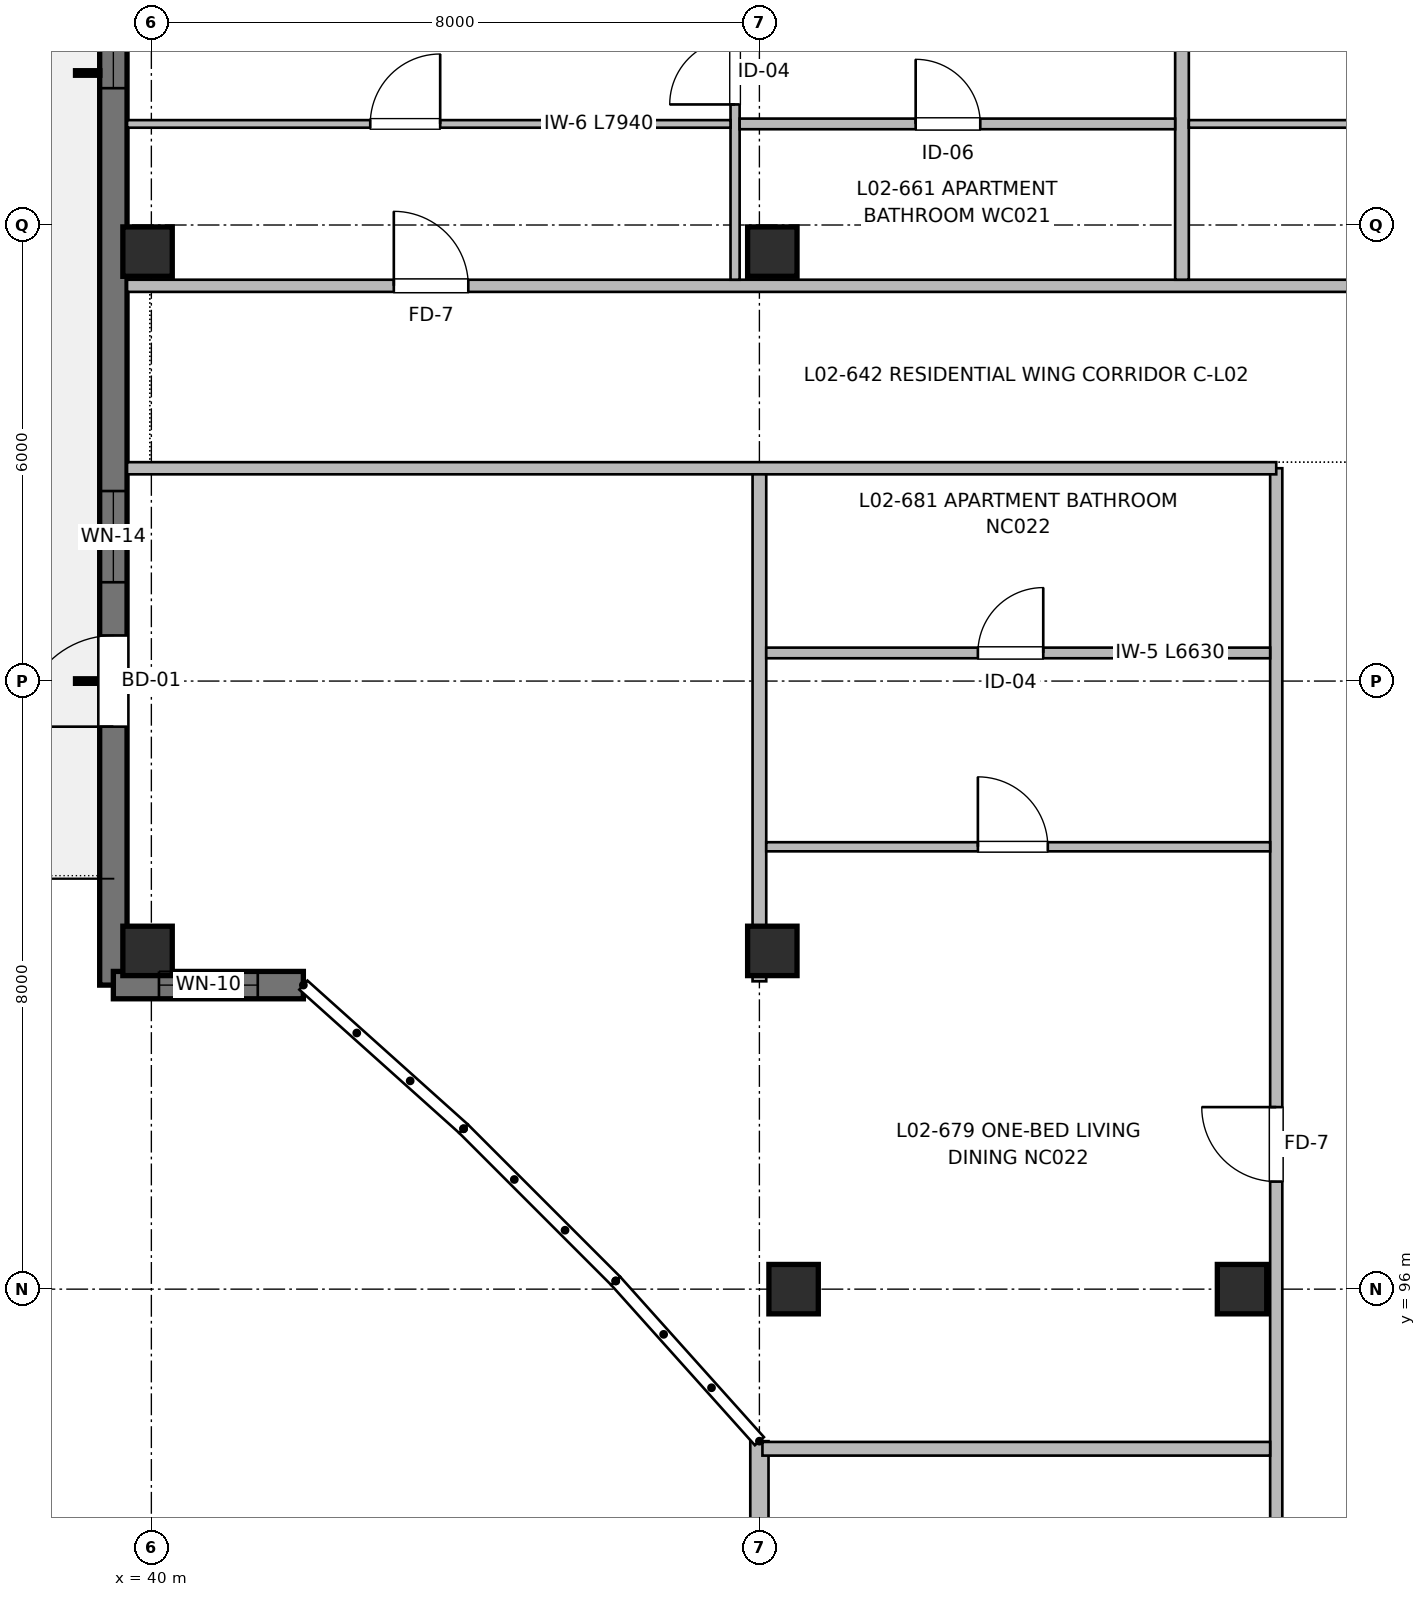
"""IFC4 building model, lengths in metres.
Left out: names, types, materials, properties, quantities, classifications, styles, units other than length and angle.
Written with IfcOpenShell. Run it as: python <this file> out.ifc"""

import sys

from ifc_helpers import new_model, si_unit, direction, frame, frame_2d, origin, origin_2d, place, context, subcontext, project, spatial, rectangle, extrude, element, fill, save


model = new_model("IFC4")
c1 = context("Model", 3, precision=1e-05, world=origin(), true_north=direction((0.0, 1.0)))
c2 = subcontext(c1, "Body", "Model", "MODEL_VIEW")
j1 = project(units=[si_unit("LENGTHUNIT", "METRE"), si_unit("PLANEANGLEUNIT", "RADIAN")], contexts=[c1])
p1 = place(None, origin())
s1 = spatial("IfcSite", under=j1, at=p1, CompositionType="ELEMENT")
p2 = place(p1, origin())
s2 = spatial("IfcBuilding", under=s1, at=p2, CompositionType="ELEMENT")
p3 = place(p2, frame((0.0, 0.0, 7.36)))
s3 = spatial("IfcBuildingStorey", under=s2, at=p3, CompositionType="ELEMENT", Elevation=7.36)
for number, where, z_axis, x_axis in (
    (1, (39.95, 100.45, 0.0), (0.0, 0.0, 1.0), (1.0, 0.0, 0.0)),
    (2, (39.95, 109.65, 0.0), (0.0, 0.0, 1.0), (1.0, 0.0, 0.0)),
    (3, (48.17, 100.45, 0.0), (0.0, 0.0, 1.0), (1.0, 0.0, 0.0)),
    (4, (48.17, 109.65, 0.0), (0.0, 0.0, 1.0), (1.0, 0.0, 0.0)),
    (5, (48.45, 96.0, 0.0), (0.0, 0.0, 1.0), (1.0, 0.0, 0.0)),
    (6, (54.35, 96.0, 0.0), (0.0, 0.0, 1.0), (1.0, 0.0, 0.0)),
):
    element("IfcColumn", number, at=place(p3, frame(where, z_axis=z_axis, x_axis=x_axis)), inside=s3, PredefinedType="COLUMN", context=c2, shape_type="SweptSolid", body=[
        extrude(rectangle(XDim=0.65, YDim=0.65, at=origin_2d()), origin(), (0.0, 0.0, 1.0), 3.2),
    ])
p4 = place(p3, frame((39.5, 100.0, 0.0), z_axis=(0.0, 0.0, 1.0), x_axis=(0.0, 1.0, 0.0)))
e7 = element("IfcWall", 7, at=p4, inside=s3, PredefinedType="SHEAR", context=c2, shape_type="SweptSolid", body=[
    extrude(rectangle(XDim=16.0, YDim=0.36, at=frame_2d((8.0, 0.0))), origin(), (0.0, 0.0, 1.0), 2.98),
])
p5 = place(p4, frame((3.4, 0.0, 0.0)))
e8 = element("IfcOpeningElement", 8, at=p5, cuts=e7, PredefinedType="OPENING", context=c2, shape_type="SweptSolid", body=[
    extrude(rectangle(XDim=1.2, YDim=2.2, at=frame_2d((0.6, 1.1))), frame((0.0, 0.19, 0.0), z_axis=(0.0, -1.0, 0.0), x_axis=(1.0, 0.0, 0.0)), (0.0, 0.0, 1.0), 0.38),
])
p6 = place(p4, frame((5.3, 0.0, 0.9)))
e9 = element("IfcOpeningElement", 9, at=p6, cuts=e7, PredefinedType="OPENING", context=c2, shape_type="SweptSolid", body=[
    extrude(rectangle(XDim=1.2, YDim=1.05, at=frame_2d((0.6, 0.525))), frame((0.0, 0.19, 0.0), z_axis=(0.0, -1.0, 0.0), x_axis=(1.0, 0.0, 0.0)), (0.0, 0.0, 1.0), 0.38),
])
p7 = place(p4, frame((11.8, 0.0, 0.67)))
e10 = element("IfcOpeningElement", 10, at=p7, cuts=e7, PredefinedType="OPENING", context=c2, shape_type="SweptSolid", body=[
    extrude(rectangle(XDim=2.1, YDim=1.55, at=frame_2d((1.05, 0.775))), frame((0.0, 0.19, 0.0), z_axis=(0.0, -1.0, 0.0), x_axis=(1.0, 0.0, 0.0)), (0.0, 0.0, 1.0), 0.38),
])
p8 = place(p3, frame((42.0, 100.0, 0.0), z_axis=(0.0, 0.0, 1.0), x_axis=(-1.0, 0.0, 0.0)))
e11 = element("IfcWall", 11, at=p8, inside=s3, PredefinedType="SHEAR", context=c2, shape_type="SweptSolid", body=[
    extrude(rectangle(XDim=2.5, YDim=0.36, at=frame_2d((1.25, 0.0))), origin(), (0.0, 0.0, 1.0), 2.98),
])
p9 = place(p8, frame((0.6, 0.0, 0.82)))
e12 = element("IfcOpeningElement", 12, at=p9, cuts=e11, PredefinedType="OPENING", context=c2, shape_type="SweptSolid", body=[
    extrude(rectangle(XDim=1.3, YDim=1.4, at=frame_2d((0.65, 0.7))), frame((0.0, 0.19, 0.0), z_axis=(0.0, -1.0, 0.0), x_axis=(1.0, 0.0, 0.0)), (0.0, 0.0, 1.0), 0.38),
])
p10 = place(p3, frame((48.0, 56.0, 0.0), z_axis=(0.0, 0.0, 1.0), x_axis=(0.0, 1.0, 0.0)))
e13 = element("IfcWall", 13, at=p10, inside=s3, PredefinedType="SOLIDWALL", context=c2, shape_type="SweptSolid", body=[
    extrude(rectangle(XDim=38.0, YDim=0.24, at=frame_2d((19.0, 0.0))), origin(), (0.0, 0.0, 1.0), 2.98),
])
p11 = place(p10, frame((4.95, 0.0, 0.0)))
e14 = element("IfcOpeningElement", 14, at=p11, cuts=e13, PredefinedType="OPENING", context=c2, shape_type="SweptSolid", body=[
    extrude(rectangle(XDim=1.2, YDim=2.2, at=frame_2d((0.6, 1.1))), frame((0.0, 0.13, 0.0), z_axis=(0.0, -1.0, 0.0), x_axis=(1.0, 0.0, 0.0)), (0.0, 0.0, 1.0), 0.26),
])
p12 = place(p10, frame((13.2, 0.0, 0.67)))
e15 = element("IfcOpeningElement", 15, at=p12, cuts=e13, PredefinedType="OPENING", context=c2, shape_type="SweptSolid", body=[
    extrude(rectangle(XDim=2.1, YDim=1.55, at=frame_2d((1.05, 0.775))), frame((0.0, 0.13, 0.0), z_axis=(0.0, -1.0, 0.0), x_axis=(1.0, 0.0, 0.0)), (0.0, 0.0, 1.0), 0.26),
])
p13 = place(p10, frame((18.825, 0.0, 0.72)))
e16 = element("IfcOpeningElement", 16, at=p13, cuts=e13, PredefinedType="OPENING", context=c2, shape_type="SweptSolid", body=[
    extrude(rectangle(XDim=2.25, YDim=1.5, at=frame_2d((1.125, 0.75))), frame((0.0, 0.13, 0.0), z_axis=(0.0, -1.0, 0.0), x_axis=(1.0, 0.0, 0.0)), (0.0, 0.0, 1.0), 0.26),
])
p14 = place(p10, frame((32.725, 0.0, 0.9)))
e17 = element("IfcOpeningElement", 17, at=p14, cuts=e13, PredefinedType="OPENING", context=c2, shape_type="SweptSolid", body=[
    extrude(rectangle(XDim=1.05, YDim=1.15, at=frame_2d((0.525, 0.575))), frame((0.0, 0.13, 0.0), z_axis=(0.0, -1.0, 0.0), x_axis=(1.0, 0.0, 0.0)), (0.0, 0.0, 1.0), 0.26),
])
p15 = place(p3, frame((54.8, 56.18, 0.0), z_axis=(0.0, 0.0, 1.0), x_axis=(0.0, 1.0, 0.0)))
e18 = element("IfcWall", 18, at=p15, inside=s3, PredefinedType="PARTITIONING", context=c2, shape_type="SweptSolid", body=[
    extrude(rectangle(XDim=50.62, YDim=0.16, at=frame_2d((25.31, 0.0))), origin(), (0.0, 0.0, 1.0), 2.935),
])
p16 = place(p15, frame((12.82, 0.0, 0.0)))
e19 = element("IfcOpeningElement", 19, at=p16, cuts=e18, PredefinedType="OPENING", context=c2, shape_type="SweptSolid", body=[
    extrude(rectangle(XDim=1.1, YDim=2.15, at=frame_2d((0.55, 1.075))), frame((0.0, 0.09, 0.0), z_axis=(0.0, -1.0, 0.0), x_axis=(1.0, 0.0, 0.0)), (0.0, 0.0, 1.0), 0.18),
])
p17 = place(p15, frame((19.22, 0.0, 0.0)))
e20 = element("IfcOpeningElement", 20, at=p17, cuts=e18, PredefinedType="OPENING", context=c2, shape_type="SweptSolid", body=[
    extrude(rectangle(XDim=1.6, YDim=2.15, at=frame_2d((0.8, 1.075))), frame((0.0, 0.09, 0.0), z_axis=(0.0, -1.0, 0.0), x_axis=(1.0, 0.0, 0.0)), (0.0, 0.0, 1.0), 0.18),
])
p18 = place(p15, frame((1.8, 0.0, 0.0)))
e21 = element("IfcOpeningElement", 21, at=p18, cuts=e18, PredefinedType="OPENING", context=c2, shape_type="SweptSolid", body=[
    extrude(rectangle(XDim=0.96, YDim=2.15, at=frame_2d((0.48, 1.075))), frame((0.0, 0.09, 0.0), z_axis=(0.0, -1.0, 0.0), x_axis=(1.0, 0.0, 0.0)), (0.0, 0.0, 1.0), 0.18),
])
p19 = place(p15, frame((32.625, 0.0, 0.0)))
e22 = element("IfcOpeningElement", 22, at=p19, cuts=e18, PredefinedType="OPENING", context=c2, shape_type="SweptSolid", body=[
    extrude(rectangle(XDim=0.98, YDim=2.15, at=frame_2d((0.49, 1.075))), frame((0.0, 0.09, 0.0), z_axis=(0.0, -1.0, 0.0), x_axis=(1.0, 0.0, 0.0)), (0.0, 0.0, 1.0), 0.18),
])
p20 = place(p15, frame((41.235, 0.0, 0.0)))
e23 = element("IfcOpeningElement", 23, at=p20, cuts=e18, PredefinedType="OPENING", context=c2, shape_type="SweptSolid", body=[
    extrude(rectangle(XDim=0.98, YDim=2.15, at=frame_2d((0.49, 1.075))), frame((0.0, 0.09, 0.0), z_axis=(0.0, -1.0, 0.0), x_axis=(1.0, 0.0, 0.0)), (0.0, 0.0, 1.0), 0.18),
])
p21 = place(p3, frame((39.68, 106.8, 0.0), z_axis=(0.0, 0.0, 1.0), x_axis=(1.0, 0.0, 0.0)))
e24 = element("IfcWall", 24, at=p21, inside=s3, PredefinedType="PARTITIONING", context=c2, shape_type="SweptSolid", body=[
    extrude(rectangle(XDim=15.12, YDim=0.16, at=frame_2d((7.56, 0.0))), origin(), (0.0, 0.0, 1.0), 2.935),
])
p22 = place(p3, frame((39.68, 109.2, 0.0), z_axis=(0.0, 0.0, 1.0), x_axis=(1.0, 0.0, 0.0)))
e25 = element("IfcWall", 25, at=p22, inside=s3, PredefinedType="PARTITIONING", context=c2, shape_type="SweptSolid", body=[
    extrude(rectangle(XDim=41.64, YDim=0.16, at=frame_2d((20.82, 0.0))), origin(), (0.0, 0.0, 1.0), 2.935),
])
p23 = place(p22, frame((3.51, 0.0, 0.0)))
e26 = element("IfcOpeningElement", 26, at=p23, cuts=e25, PredefinedType="OPENING", context=c2, shape_type="SweptSolid", body=[
    extrude(rectangle(XDim=0.98, YDim=2.15, at=frame_2d((0.49, 1.075))), frame((0.0, 0.09, 0.0), z_axis=(0.0, -1.0, 0.0), x_axis=(1.0, 0.0, 0.0)), (0.0, 0.0, 1.0), 0.18),
])
p24 = place(p22, frame((17.455, 0.0, 0.0)))
e27 = element("IfcOpeningElement", 27, at=p24, cuts=e25, PredefinedType="OPENING", context=c2, shape_type="SweptSolid", body=[
    extrude(rectangle(XDim=0.98, YDim=2.15, at=frame_2d((0.49, 1.075))), frame((0.0, 0.09, 0.0), z_axis=(0.0, -1.0, 0.0), x_axis=(1.0, 0.0, 0.0)), (0.0, 0.0, 1.0), 0.18),
])
p25 = place(p22, frame((31.36, 0.0, 0.0)))
e28 = element("IfcOpeningElement", 28, at=p25, cuts=e25, PredefinedType="OPENING", context=c2, shape_type="SweptSolid", body=[
    extrude(rectangle(XDim=0.98, YDim=2.15, at=frame_2d((0.49, 1.075))), frame((0.0, 0.09, 0.0), z_axis=(0.0, -1.0, 0.0), x_axis=(1.0, 0.0, 0.0)), (0.0, 0.0, 1.0), 0.18),
])
p26 = place(p3, frame((48.0, 100.05, 0.0), z_axis=(0.0, 0.0, 1.0), x_axis=(0.0, 1.0, 0.0)))
e29 = element("IfcWall", 29, at=p26, inside=s3, PredefinedType="PARTITIONING", context=c2, shape_type="SweptSolid", body=[
    extrude(rectangle(XDim=6.67, YDim=0.18, at=frame_2d((3.335, 0.0))), origin(), (0.0, 0.0, 1.0), 2.68),
])
p27 = place(p3, frame((53.56, 109.28, 0.0), z_axis=(0.0, 0.0, 1.0), x_axis=(0.0, 1.0, 0.0)))
e30 = element("IfcWall", 30, at=p27, inside=s3, PredefinedType="PARTITIONING", context=c2, shape_type="SweptSolid", body=[
    extrude(rectangle(XDim=6.6, YDim=0.18, at=frame_2d((3.3, 0.0))), origin(), (0.0, 0.0, 1.0), 2.935),
])
p28 = place(p3, frame((47.68, 109.28, 0.0), z_axis=(0.0, 0.0, 1.0), x_axis=(0.0, 1.0, 0.0)))
e31 = element("IfcWall", 31, at=p28, inside=s3, PredefinedType="PARTITIONING", context=c2, shape_type="SweptSolid", body=[
    extrude(rectangle(XDim=6.6, YDim=0.12, at=frame_2d((3.3, 0.0))), origin(), (0.0, 0.0, 1.0), 2.935),
])
p29 = place(p28, frame((2.306, 0.0, 0.0)))
e32 = element("IfcOpeningElement", 32, at=p29, cuts=e31, PredefinedType="OPENING", context=c2, shape_type="SweptSolid", body=[
    extrude(rectangle(XDim=0.86, YDim=2.1, at=frame_2d((0.43, 1.05))), frame((0.0, 0.07, 0.0), z_axis=(0.0, -1.0, 0.0), x_axis=(1.0, 0.0, 0.0)), (0.0, 0.0, 1.0), 0.14),
])
p30 = place(p28, frame((4.097, 0.0, 0.0)))
e33 = element("IfcOpeningElement", 33, at=p30, cuts=e31, PredefinedType="OPENING", context=c2, shape_type="SweptSolid", body=[
    extrude(rectangle(XDim=0.9, YDim=2.1, at=frame_2d((0.45, 1.05))), frame((0.0, 0.07, 0.0), z_axis=(0.0, -1.0, 0.0), x_axis=(1.0, 0.0, 0.0)), (0.0, 0.0, 1.0), 0.14),
])
p31 = place(p3, frame((47.74, 111.33, 0.0), z_axis=(0.0, 0.0, 1.0), x_axis=(1.0, 0.0, 0.0)))
e34 = element("IfcWall", 34, at=p31, inside=s3, PredefinedType="PARTITIONING", context=c2, shape_type="SweptSolid", body=[
    extrude(rectangle(XDim=5.73, YDim=0.14, at=frame_2d((2.865, 0.0))), origin(), (0.0, 0.0, 1.0), 2.935),
])
p32 = place(p31, frame((2.316, 0.0, 0.0)))
e35 = element("IfcOpeningElement", 35, at=p32, cuts=e34, PredefinedType="OPENING", context=c2, shape_type="SweptSolid", body=[
    extrude(rectangle(XDim=0.85, YDim=2.05, at=frame_2d((0.425, 1.025))), frame((0.0, 0.08, 0.0), z_axis=(0.0, -1.0, 0.0), x_axis=(1.0, 0.0, 0.0)), (0.0, 0.0, 1.0), 0.16),
])
p33 = place(p3, frame((39.68, 111.33, 0.0), z_axis=(0.0, 0.0, 1.0), x_axis=(1.0, 0.0, 0.0)))
e36 = element("IfcWall", 36, at=p33, inside=s3, PredefinedType="PARTITIONING", context=c2, shape_type="SweptSolid", body=[
    extrude(rectangle(XDim=7.94, YDim=0.1, at=frame_2d((3.97, 0.0))), origin(), (0.0, 0.0, 1.0), 2.935),
])
p34 = place(p33, frame((3.2, 0.0, 0.0)))
e37 = element("IfcOpeningElement", 37, at=p34, cuts=e36, PredefinedType="OPENING", context=c2, shape_type="SweptSolid", body=[
    extrude(rectangle(XDim=0.92, YDim=2.1, at=frame_2d((0.46, 1.05))), frame((0.0, 0.06, 0.0), z_axis=(0.0, -1.0, 0.0), x_axis=(1.0, 0.0, 0.0)), (0.0, 0.0, 1.0), 0.12),
])
p35 = place(p3, frame((53.65, 111.33, 0.0), z_axis=(0.0, 0.0, 1.0), x_axis=(1.0, 0.0, 0.0)))
e38 = element("IfcWall", 38, at=p35, inside=s3, PredefinedType="PARTITIONING", context=c2, shape_type="SweptSolid", body=[
    extrude(rectangle(XDim=7.89, YDim=0.1, at=frame_2d((3.945, 0.0))), origin(), (0.0, 0.0, 1.0), 2.935),
])
p36 = place(p35, frame((3.18, 0.0, 0.0)))
e39 = element("IfcOpeningElement", 39, at=p36, cuts=e38, PredefinedType="OPENING", context=c2, shape_type="SweptSolid", body=[
    extrude(rectangle(XDim=0.92, YDim=2.1, at=frame_2d((0.46, 1.05))), frame((0.0, 0.06, 0.0), z_axis=(0.0, -1.0, 0.0), x_axis=(1.0, 0.0, 0.0)), (0.0, 0.0, 1.0), 0.12),
])
p37 = place(p3, frame((48.04, 93.9, 0.0), z_axis=(0.0, 0.0, 1.0), x_axis=(1.0, 0.0, 0.0)))
e40 = element("IfcWall", 40, at=p37, inside=s3, PredefinedType="PARTITIONING", context=c2, shape_type="SweptSolid", body=[
    extrude(rectangle(XDim=6.68, YDim=0.18, at=frame_2d((3.34, 0.0))), origin(), (0.0, 0.0, 1.0), 2.935),
])
p38 = place(p3, frame((48.09, 101.82, 0.0), z_axis=(0.0, 0.0, 1.0), x_axis=(1.0, 0.0, 0.0)))
e41 = element("IfcWall", 41, at=p38, inside=s3, PredefinedType="PARTITIONING", context=c2, shape_type="SweptSolid", body=[
    extrude(rectangle(XDim=6.63, YDim=0.12, at=frame_2d((3.315, 0.0))), origin(), (0.0, 0.0, 1.0), 2.935),
])
p39 = place(p38, frame((2.785, 0.0, 0.0)))
e42 = element("IfcOpeningElement", 42, at=p39, cuts=e41, PredefinedType="OPENING", context=c2, shape_type="SweptSolid", body=[
    extrude(rectangle(XDim=0.92, YDim=2.1, at=frame_2d((0.46, 1.05))), frame((0.0, 0.07, 0.0), z_axis=(0.0, -1.0, 0.0), x_axis=(1.0, 0.0, 0.0)), (0.0, 0.0, 1.0), 0.14),
])
p40 = place(p3, frame((48.09, 104.37, 0.0), z_axis=(0.0, 0.0, 1.0), x_axis=(1.0, 0.0, 0.0)))
e43 = element("IfcWall", 43, at=p40, inside=s3, PredefinedType="PARTITIONING", context=c2, shape_type="SweptSolid", body=[
    extrude(rectangle(XDim=6.63, YDim=0.14, at=frame_2d((3.315, 0.0))), origin(), (0.0, 0.0, 1.0), 2.935),
])
p41 = place(p40, frame((2.785, 0.0, 0.0)))
e44 = element("IfcOpeningElement", 44, at=p41, cuts=e43, PredefinedType="OPENING", context=c2, shape_type="SweptSolid", body=[
    extrude(rectangle(XDim=0.86, YDim=2.1, at=frame_2d((0.43, 1.05))), frame((0.0, 0.08, 0.0), z_axis=(0.0, -1.0, 0.0), x_axis=(1.0, 0.0, 0.0)), (0.0, 0.0, 1.0), 0.16),
])
p42 = place(p5, origin())
e45 = element("IfcDoor", 45, at=p42, inside=s3, OperationType="SINGLE_SWING_LEFT", PredefinedType="DOOR", context=c2, shape_type="SweptSolid", body=[
    extrude(rectangle(XDim=1.2, YDim=2.2, at=frame_2d((0.6, 1.1))), frame((0.0, 0.025, 0.0), z_axis=(0.0, -1.0, 0.0), x_axis=(1.0, 0.0, 0.0)), (0.0, 0.0, 1.0), 0.05),
])
fill(e8, e45)
p43 = place(p6, origin())
e46 = element("IfcWindow", 46, at=p43, inside=s3, PartitioningType="SINGLE_PANEL", PredefinedType="WINDOW", context=c2, shape_type="SweptSolid", body=[
    extrude(rectangle(XDim=1.2, YDim=1.05, at=frame_2d((0.6, 0.525))), frame((0.0, 0.03, 0.0), z_axis=(0.0, -1.0, 0.0), x_axis=(1.0, 0.0, 0.0)), (0.0, 0.0, 1.0), 0.06),
])
fill(e9, e46)
p44 = place(p7, origin())
e47 = element("IfcWindow", 47, at=p44, inside=s3, PartitioningType="SINGLE_PANEL", PredefinedType="WINDOW", context=c2, shape_type="SweptSolid", body=[
    extrude(rectangle(XDim=2.1, YDim=1.55, at=frame_2d((1.05, 0.775))), frame((0.0, 0.03, 0.0), z_axis=(0.0, -1.0, 0.0), x_axis=(1.0, 0.0, 0.0)), (0.0, 0.0, 1.0), 0.06),
])
fill(e10, e47)
p45 = place(p9, origin())
e48 = element("IfcWindow", 48, at=p45, inside=s3, PartitioningType="SINGLE_PANEL", PredefinedType="WINDOW", context=c2, shape_type="SweptSolid", body=[
    extrude(rectangle(XDim=1.3, YDim=1.4, at=frame_2d((0.65, 0.7))), frame((0.0, 0.03, 0.0), z_axis=(0.0, -1.0, 0.0), x_axis=(1.0, 0.0, 0.0)), (0.0, 0.0, 1.0), 0.06),
])
fill(e12, e48)
p46 = place(p23, origin())
e49 = element("IfcDoor", 49, at=p46, inside=s3, OperationType="SINGLE_SWING_LEFT", PredefinedType="DOOR", context=c2, shape_type="SweptSolid", body=[
    extrude(rectangle(XDim=0.98, YDim=2.15, at=frame_2d((0.49, 1.075))), frame((0.0, 0.025, 0.0), z_axis=(0.0, -1.0, 0.0), x_axis=(1.0, 0.0, 0.0)), (0.0, 0.0, 1.0), 0.05),
])
fill(e26, e49)
p47 = place(p34, origin())
e50 = element("IfcDoor", 50, at=p47, inside=s3, OperationType="SINGLE_SWING_RIGHT", PredefinedType="DOOR", context=c2, shape_type="SweptSolid", body=[
    extrude(rectangle(XDim=0.92, YDim=2.1, at=frame_2d((0.46, 1.05))), frame((0.0, 0.025, 0.0), z_axis=(0.0, -1.0, 0.0), x_axis=(1.0, 0.0, 0.0)), (0.0, 0.0, 1.0), 0.05),
])
fill(e37, e50)
p48 = place(p29, origin())
e51 = element("IfcDoor", 51, at=p48, inside=s3, OperationType="SINGLE_SWING_LEFT", PredefinedType="DOOR", context=c2, shape_type="SweptSolid", body=[
    extrude(rectangle(XDim=0.86, YDim=2.1, at=frame_2d((0.43, 1.05))), frame((0.0, 0.025, 0.0), z_axis=(0.0, -1.0, 0.0), x_axis=(1.0, 0.0, 0.0)), (0.0, 0.0, 1.0), 0.05),
])
fill(e32, e51)
p49 = place(p32, origin())
e52 = element("IfcDoor", 52, at=p49, inside=s3, OperationType="SINGLE_SWING_LEFT", PredefinedType="DOOR", context=c2, shape_type="SweptSolid", body=[
    extrude(rectangle(XDim=0.85, YDim=2.05, at=frame_2d((0.425, 1.025))), frame((0.0, 0.025, 0.0), z_axis=(0.0, -1.0, 0.0), x_axis=(1.0, 0.0, 0.0)), (0.0, 0.0, 1.0), 0.05),
])
fill(e35, e52)
p50 = place(p41, origin())
e53 = element("IfcDoor", 53, at=p50, inside=s3, OperationType="SINGLE_SWING_RIGHT", PredefinedType="DOOR", context=c2, shape_type="SweptSolid", body=[
    extrude(rectangle(XDim=0.86, YDim=2.1, at=frame_2d((0.43, 1.05))), frame((0.0, 0.025, 0.0), z_axis=(0.0, -1.0, 0.0), x_axis=(1.0, 0.0, 0.0)), (0.0, 0.0, 1.0), 0.05),
])
fill(e44, e53)
p51 = place(p39, origin())
e54 = element("IfcDoor", 54, at=p51, inside=s3, OperationType="SINGLE_SWING_LEFT", PredefinedType="DOOR", context=c2, shape_type="SweptSolid", body=[
    extrude(rectangle(XDim=0.92, YDim=2.1, at=frame_2d((0.46, 1.05))), frame((0.0, 0.025, 0.0), z_axis=(0.0, -1.0, 0.0), x_axis=(1.0, 0.0, 0.0)), (0.0, 0.0, 1.0), 0.05),
])
fill(e42, e54)
p52 = place(p20, origin())
e55 = element("IfcDoor", 55, at=p52, inside=s3, OperationType="SINGLE_SWING_RIGHT", PredefinedType="DOOR", context=c2, shape_type="SweptSolid", body=[
    extrude(rectangle(XDim=0.98, YDim=2.15, at=frame_2d((0.49, 1.075))), frame((0.0, 0.025, 0.0), z_axis=(0.0, -1.0, 0.0), x_axis=(1.0, 0.0, 0.0)), (0.0, 0.0, 1.0), 0.05),
])
fill(e23, e55)
save(model, sys.argv[1])
